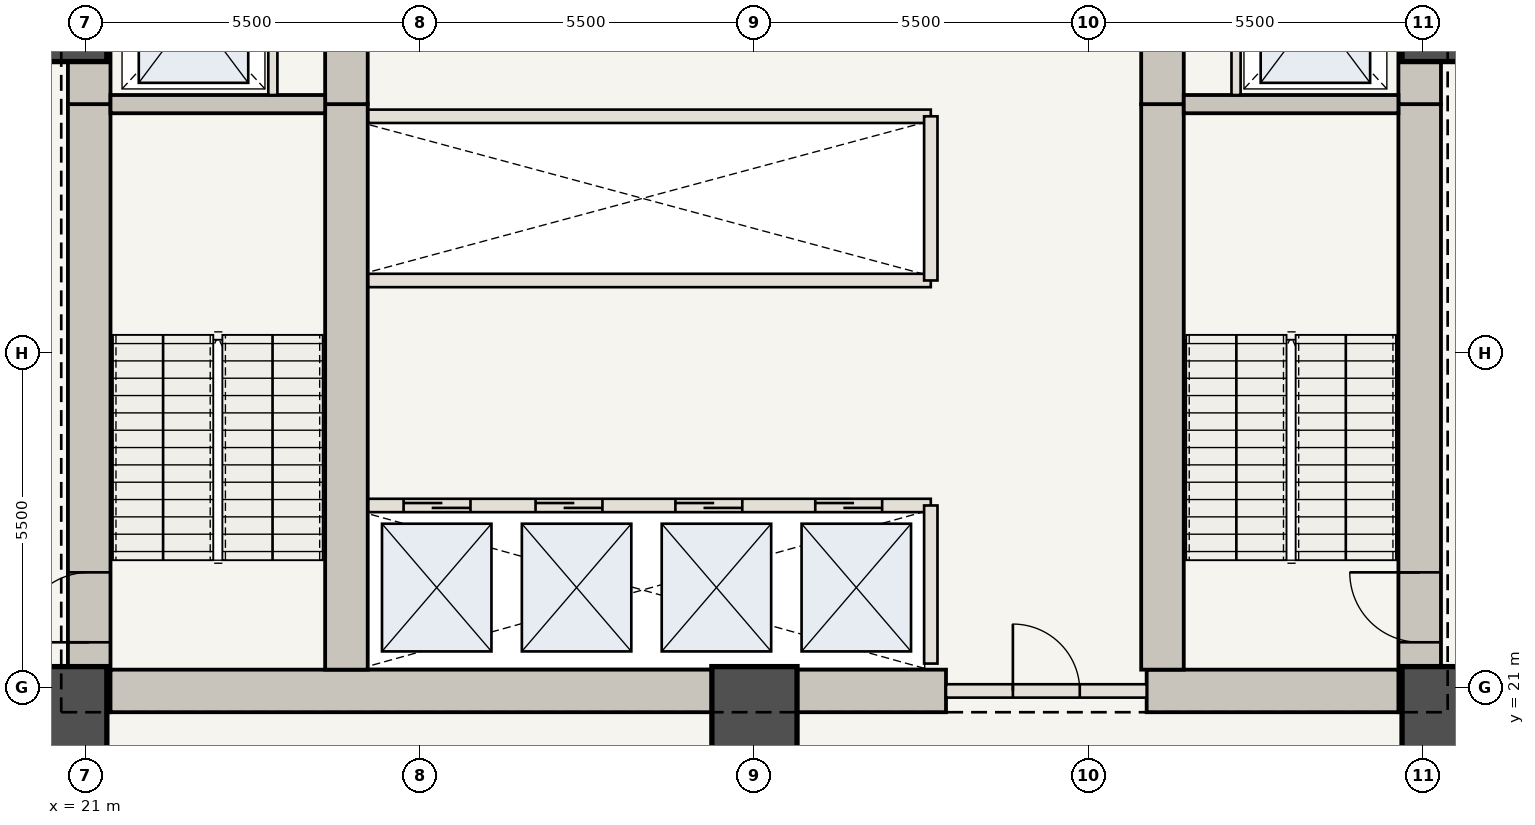
"""IFC4 building model, lengths in metres.
Left out: names, types, materials, properties, quantities, classifications, styles, units other than length and angle.
Written with IfcOpenShell. Run it as: python <this file> out.ifc"""

import sys

from ifc_helpers import new_model, si_unit, direction, frame, frame_2d, origin, origin_2d, place, context, subcontext, project, spatial, rectangle, extrude, element, fill, save


model = new_model("IFC4")
c1 = context("Model", 3, precision=1e-05, world=origin(), true_north=direction((0.0, 1.0)))
c2 = subcontext(c1, "Body", "Model", "MODEL_VIEW")
j1 = project(units=[si_unit("LENGTHUNIT", "METRE"), si_unit("PLANEANGLEUNIT", "RADIAN")], contexts=[c1])
p1 = place(None, origin())
s1 = spatial("IfcSite", under=j1, at=p1, CompositionType="ELEMENT")
p2 = place(p1, origin())
s2 = spatial("IfcBuilding", under=s1, at=p2, CompositionType="ELEMENT")
p3 = place(p2, frame((0.0, 0.0, 29.4)))
s3 = spatial("IfcBuildingStorey", under=s2, at=p3, CompositionType="ELEMENT", Elevation=29.4)
p4 = place(p3, frame((21.06, 20.6, 0.0), z_axis=(0.0, 0.0, 1.0), x_axis=(0.0, 1.0, 0.0)))
e1 = element("IfcWall", 1, at=p4, inside=s3, PredefinedType="SHEAR", context=c2, shape_type="SweptSolid", body=[
    extrude(rectangle(XDim=10.0, YDim=0.7, at=frame_2d((5.0, 0.0))), origin(), (0.0, 0.0, 1.0), 4.9),
])
p5 = place(p4, frame((1.15, 0.0, 0.0)))
e2 = element("IfcOpeningElement", 2, at=p5, cuts=e1, PredefinedType="OPENING", context=c2, shape_type="SweptSolid", body=[
    extrude(rectangle(XDim=1.15, YDim=2.15, at=frame_2d((0.575, 1.075))), frame((0.0, 0.36, 0.0), z_axis=(0.0, -1.0, 0.0), x_axis=(1.0, 0.0, 0.0)), (0.0, 0.0, 1.0), 0.72),
])
p6 = place(p3, frame((21.06, 30.6, 0.0), z_axis=(0.0, 0.0, 1.0), x_axis=(0.0, 1.0, 0.0)))
e3 = element("IfcWall", 3, at=p6, inside=s3, PredefinedType="SHEAR", context=c2, shape_type="SweptSolid", body=[
    extrude(rectangle(XDim=12.75, YDim=0.7, at=frame_2d((6.375, 0.0))), origin(), (0.0, 0.0, 1.0), 4.9),
])
p7 = place(p6, frame((4.2, 0.0, 0.0)))
e4 = element("IfcOpeningElement", 4, at=p7, cuts=e3, PredefinedType="OPENING", context=c2, shape_type="SweptSolid", body=[
    extrude(rectangle(XDim=1.1, YDim=2.15, at=frame_2d((0.55, 1.075))), frame((0.0, 0.36, 0.0), z_axis=(0.0, -1.0, 0.0), x_axis=(1.0, 0.0, 0.0)), (0.0, 0.0, 1.0), 0.72),
])
p8 = place(p6, frame((9.2, 0.0, 0.0)))
e5 = element("IfcOpeningElement", 5, at=p8, cuts=e3, PredefinedType="OPENING", context=c2, shape_type="SweptSolid", body=[
    extrude(rectangle(XDim=0.92, YDim=2.1, at=frame_2d((0.46, 1.05))), frame((0.0, 0.36, 0.0), z_axis=(0.0, -1.0, 0.0), x_axis=(1.0, 0.0, 0.0)), (0.0, 0.0, 1.0), 0.72),
])
p9 = place(p3, frame((42.94, 20.6, 0.0), z_axis=(0.0, 0.0, 1.0), x_axis=(0.0, 1.0, 0.0)))
e6 = element("IfcWall", 6, at=p9, inside=s3, PredefinedType="SHEAR", context=c2, shape_type="SweptSolid", body=[
    extrude(rectangle(XDim=10.0, YDim=0.7, at=frame_2d((5.0, 0.0))), origin(), (0.0, 0.0, 1.0), 4.9),
])
p10 = place(p9, frame((1.15, 0.0, 0.0)))
e7 = element("IfcOpeningElement", 7, at=p10, cuts=e6, PredefinedType="OPENING", context=c2, shape_type="SweptSolid", body=[
    extrude(rectangle(XDim=1.15, YDim=2.15, at=frame_2d((0.575, 1.075))), frame((0.0, 0.36, 0.0), z_axis=(0.0, -1.0, 0.0), x_axis=(1.0, 0.0, 0.0)), (0.0, 0.0, 1.0), 0.72),
])
p11 = place(p3, frame((42.94, 30.6, 0.0), z_axis=(0.0, 0.0, 1.0), x_axis=(0.0, 1.0, 0.0)))
e8 = element("IfcWall", 8, at=p11, inside=s3, PredefinedType="SHEAR", context=c2, shape_type="SweptSolid", body=[
    extrude(rectangle(XDim=12.75, YDim=0.7, at=frame_2d((6.375, 0.0))), origin(), (0.0, 0.0, 1.0), 4.9),
])
p12 = place(p11, frame((4.2, 0.0, 0.0)))
e9 = element("IfcOpeningElement", 9, at=p12, cuts=e8, PredefinedType="OPENING", context=c2, shape_type="SweptSolid", body=[
    extrude(rectangle(XDim=1.1, YDim=2.15, at=frame_2d((0.55, 1.075))), frame((0.0, 0.36, 0.0), z_axis=(0.0, -1.0, 0.0), x_axis=(1.0, 0.0, 0.0)), (0.0, 0.0, 1.0), 0.72),
])
p13 = place(p11, frame((8.05, 0.0, 0.0)))
e10 = element("IfcOpeningElement", 10, at=p13, cuts=e8, PredefinedType="OPENING", context=c2, shape_type="SweptSolid", body=[
    extrude(rectangle(XDim=0.88, YDim=2.1, at=frame_2d((0.44, 1.05))), frame((0.0, 0.36, 0.0), z_axis=(0.0, -1.0, 0.0), x_axis=(1.0, 0.0, 0.0)), (0.0, 0.0, 1.0), 0.72),
])
p14 = place(p11, frame((9.45, 0.0, 0.0)))
e11 = element("IfcOpeningElement", 11, at=p14, cuts=e8, PredefinedType="OPENING", context=c2, shape_type="SweptSolid", body=[
    extrude(rectangle(XDim=0.88, YDim=2.1, at=frame_2d((0.44, 1.05))), frame((0.0, 0.36, 0.0), z_axis=(0.0, -1.0, 0.0), x_axis=(1.0, 0.0, 0.0)), (0.0, 0.0, 1.0), 0.72),
])
p15 = place(p11, frame((10.85, 0.0, 0.0)))
e12 = element("IfcOpeningElement", 12, at=p15, cuts=e8, PredefinedType="OPENING", context=c2, shape_type="SweptSolid", body=[
    extrude(rectangle(XDim=0.88, YDim=2.1, at=frame_2d((0.44, 1.05))), frame((0.0, 0.36, 0.0), z_axis=(0.0, -1.0, 0.0), x_axis=(1.0, 0.0, 0.0)), (0.0, 0.0, 1.0), 0.72),
])
p16 = place(p3, frame((21.41, 20.95, 0.0), z_axis=(0.0, 0.0, 1.0), x_axis=(1.0, 0.0, 0.0)))
e13 = element("IfcWall", 13, at=p16, inside=s3, PredefinedType="SHEAR", context=c2, shape_type="SweptSolid", body=[
    extrude(rectangle(XDim=13.74, YDim=0.7, at=frame_2d((6.87, 0.0))), origin(), (0.0, 0.0, 1.0), 4.9),
])
p17 = place(p3, frame((38.45, 20.95, 0.0), z_axis=(0.0, 0.0, 1.0), x_axis=(1.0, 0.0, 0.0)))
e14 = element("IfcWall", 14, at=p17, inside=s3, PredefinedType="SHEAR", context=c2, shape_type="SweptSolid", body=[
    extrude(rectangle(XDim=4.14, YDim=0.7, at=frame_2d((2.07, 0.0))), origin(), (0.0, 0.0, 1.0), 4.9),
])
p18 = place(p3, frame((25.29, 21.3, 0.0), z_axis=(0.0, 0.0, 1.0), x_axis=(0.0, 1.0, 0.0)))
e15 = element("IfcWall", 15, at=p18, inside=s3, PredefinedType="SHEAR", context=c2, shape_type="SweptSolid", body=[
    extrude(rectangle(XDim=9.3, YDim=0.7, at=frame_2d((4.65, 0.0))), origin(), (0.0, 0.0, 1.0), 4.9),
])
p19 = place(p3, frame((25.29, 30.6, 0.0), z_axis=(0.0, 0.0, 1.0), x_axis=(0.0, 1.0, 0.0)))
e16 = element("IfcWall", 16, at=p19, inside=s3, PredefinedType="SHEAR", context=c2, shape_type="SweptSolid", body=[
    extrude(rectangle(XDim=12.05, YDim=0.7, at=frame_2d((6.025, 0.0))), origin(), (0.0, 0.0, 1.0), 4.9),
])
p20 = place(p19, frame((6.25, 0.0, 0.0)))
e17 = element("IfcOpeningElement", 17, at=p20, cuts=e16, PredefinedType="OPENING", context=c2, shape_type="SweptSolid", body=[
    extrude(rectangle(XDim=1.1, YDim=2.15, at=frame_2d((0.55, 1.075))), frame((0.0, 0.36, 0.0), z_axis=(0.0, -1.0, 0.0), x_axis=(1.0, 0.0, 0.0)), (0.0, 0.0, 1.0), 0.72),
])
p21 = place(p3, frame((38.71, 21.3, 0.0), z_axis=(0.0, 0.0, 1.0), x_axis=(0.0, 1.0, 0.0)))
e18 = element("IfcWall", 18, at=p21, inside=s3, PredefinedType="SHEAR", context=c2, shape_type="SweptSolid", body=[
    extrude(rectangle(XDim=9.3, YDim=0.7, at=frame_2d((4.65, 0.0))), origin(), (0.0, 0.0, 1.0), 4.9),
])
p22 = place(p3, frame((38.71, 30.6, 0.0), z_axis=(0.0, 0.0, 1.0), x_axis=(0.0, 1.0, 0.0)))
e19 = element("IfcWall", 19, at=p22, inside=s3, PredefinedType="SHEAR", context=c2, shape_type="SweptSolid", body=[
    extrude(rectangle(XDim=12.05, YDim=0.7, at=frame_2d((6.025, 0.0))), origin(), (0.0, 0.0, 1.0), 4.9),
])
for number, where, z_axis, x_axis in (
    (20, (20.65, 20.65, 0.0), (0.0, 0.0, 1.0), (1.0, 0.0, 0.0)),
    (21, (32.0, 20.65, 0.0), (0.0, 0.0, 1.0), (1.0, 0.0, 0.0)),
    (22, (43.35, 20.65, 0.0), (0.0, 0.0, 1.0), (1.0, 0.0, 0.0)),
    (23, (43.35, 32.0, 0.0), (0.0, 0.0, 1.0), (1.0, 0.0, 0.0)),
    (24, (20.65, 32.0, 0.0), (0.0, 0.0, 1.0), (1.0, 0.0, 0.0)),
):
    element("IfcColumn", number, at=place(p3, frame(where, z_axis=z_axis, x_axis=x_axis)), inside=s3, PredefinedType="COLUMN", context=c2, shape_type="SweptSolid", body=[
        extrude(rectangle(XDim=1.4, YDim=1.4, at=origin_2d()), origin(), (0.0, 0.0, 1.0), 4.48),
    ])
for number, where, z_axis, x_axis in (
    (25, (21.41, 30.6, 0.0), (0.0, 0.0, 1.0), (1.0, 0.0, 0.0)),
    (26, (39.06, 30.6, 0.0), (0.0, 0.0, 1.0), (1.0, 0.0, 0.0)),
):
    element("IfcWall", number, at=place(p3, frame(where, z_axis=z_axis, x_axis=x_axis)), inside=s3, PredefinedType="SHEAR", context=c2, shape_type="SweptSolid", body=[
        extrude(rectangle(XDim=3.53, YDim=0.3, at=frame_2d((1.765, 0.0))), origin(), (0.0, 0.0, 1.0), 4.48),
    ])
for number, where, z_axis, x_axis in (
    (27, (24.08, 30.75, 0.0), (0.0, 0.0, 1.0), (0.0, 1.0, 0.0)),
    (28, (39.92, 30.75, 0.0), (0.0, 0.0, 1.0), (0.0, 1.0, 0.0)),
):
    element("IfcWall", number, at=place(p3, frame(where, z_axis=z_axis, x_axis=x_axis)), inside=s3, PredefinedType="STANDARD", context=c2, shape_type="SweptSolid", body=[
        extrude(rectangle(XDim=2.65, YDim=0.15, at=frame_2d((1.325, 0.0))), origin(), (0.0, 0.0, 1.0), 4.48),
    ])
p23 = place(p3, frame((35.15, 20.95, 0.0), z_axis=(0.0, 0.0, 1.0), x_axis=(1.0, 0.0, 0.0)))
e29 = element("IfcWall", 29, at=p23, inside=s3, PredefinedType="STANDARD", context=c2, shape_type="SweptSolid", body=[
    extrude(rectangle(XDim=3.3, YDim=0.22, at=frame_2d((1.65, 0.0))), origin(), (0.0, 0.0, 1.0), 4.48),
])
p24 = place(p23, frame((1.1, 0.0, 0.0)))
e30 = element("IfcOpeningElement", 30, at=p24, cuts=e29, PredefinedType="OPENING", context=c2, shape_type="SweptSolid", body=[
    extrude(rectangle(XDim=1.1, YDim=2.15, at=frame_2d((0.55, 1.075))), frame((0.0, 0.12, 0.0), z_axis=(0.0, -1.0, 0.0), x_axis=(1.0, 0.0, 0.0)), (0.0, 0.0, 1.0), 0.24),
])
p25 = place(p3, frame((25.65, 24.0, 0.0), z_axis=(0.0, 0.0, 1.0), x_axis=(1.0, 0.0, 0.0)))
e31 = element("IfcWall", 31, at=p25, inside=s3, PredefinedType="STANDARD", context=c2, shape_type="SweptSolid", body=[
    extrude(rectangle(XDim=9.25, YDim=0.22, at=frame_2d((4.625, 0.0))), origin(), (0.0, 0.0, 1.0), 4.48),
])
p26 = place(p25, frame((0.58, 0.0, 0.0)))
e32 = element("IfcOpeningElement", 32, at=p26, cuts=e31, PredefinedType="OPENING", context=c2, shape_type="SweptSolid", body=[
    extrude(rectangle(XDim=1.1, YDim=2.15, at=frame_2d((0.55, 1.075))), frame((0.0, 0.12, 0.0), z_axis=(0.0, -1.0, 0.0), x_axis=(1.0, 0.0, 0.0)), (0.0, 0.0, 1.0), 0.24),
])
p27 = place(p25, frame((2.75, 0.0, 0.0)))
e33 = element("IfcOpeningElement", 33, at=p27, cuts=e31, PredefinedType="OPENING", context=c2, shape_type="SweptSolid", body=[
    extrude(rectangle(XDim=1.1, YDim=2.15, at=frame_2d((0.55, 1.075))), frame((0.0, 0.12, 0.0), z_axis=(0.0, -1.0, 0.0), x_axis=(1.0, 0.0, 0.0)), (0.0, 0.0, 1.0), 0.24),
])
p28 = place(p25, frame((5.05, 0.0, 0.0)))
e34 = element("IfcOpeningElement", 34, at=p28, cuts=e31, PredefinedType="OPENING", context=c2, shape_type="SweptSolid", body=[
    extrude(rectangle(XDim=1.1, YDim=2.15, at=frame_2d((0.55, 1.075))), frame((0.0, 0.12, 0.0), z_axis=(0.0, -1.0, 0.0), x_axis=(1.0, 0.0, 0.0)), (0.0, 0.0, 1.0), 0.24),
])
p29 = place(p25, frame((7.35, 0.0, 0.0)))
e35 = element("IfcOpeningElement", 35, at=p29, cuts=e31, PredefinedType="OPENING", context=c2, shape_type="SweptSolid", body=[
    extrude(rectangle(XDim=1.1, YDim=2.15, at=frame_2d((0.55, 1.075))), frame((0.0, 0.12, 0.0), z_axis=(0.0, -1.0, 0.0), x_axis=(1.0, 0.0, 0.0)), (0.0, 0.0, 1.0), 0.24),
])
p30 = place(p3, frame((34.9, 21.4, 0.0), z_axis=(0.0, 0.0, 1.0), x_axis=(0.0, 1.0, 0.0)))
e36 = element("IfcWall", 36, at=p30, inside=s3, PredefinedType="STANDARD", context=c2, shape_type="SweptSolid", body=[
    extrude(rectangle(XDim=2.6, YDim=0.22, at=frame_2d((1.3, 0.0))), origin(), (0.0, 0.0, 1.0), 4.48),
])
for number, where, z_axis, x_axis in (
    (37, (25.65, 27.7, 0.0), (0.0, 0.0, 1.0), (1.0, 0.0, 0.0)),
    (38, (25.65, 30.4, 0.0), (0.0, 0.0, 1.0), (1.0, 0.0, 0.0)),
):
    element("IfcWall", number, at=place(p3, frame(where, z_axis=z_axis, x_axis=x_axis)), inside=s3, PredefinedType="STANDARD", context=c2, shape_type="SweptSolid", body=[
        extrude(rectangle(XDim=9.25, YDim=0.22, at=frame_2d((4.625, 0.0))), origin(), (0.0, 0.0, 1.0), 4.48),
    ])
p31 = place(p3, frame((34.9, 27.7, 0.0), z_axis=(0.0, 0.0, 1.0), x_axis=(0.0, 1.0, 0.0)))
e39 = element("IfcWall", 39, at=p31, inside=s3, PredefinedType="STANDARD", context=c2, shape_type="SweptSolid", body=[
    extrude(rectangle(XDim=2.7, YDim=0.22, at=frame_2d((1.35, 0.0))), origin(), (0.0, 0.0, 1.0), 4.48),
])
p32 = place(p5, origin())
e40 = element("IfcDoor", 40, at=p32, inside=s3, OperationType="SINGLE_SWING_LEFT", PredefinedType="DOOR", context=c2, shape_type="SweptSolid", body=[
    extrude(rectangle(XDim=1.15, YDim=2.15, at=frame_2d((0.575, 1.075))), frame((0.0, 0.025, 0.0), z_axis=(0.0, -1.0, 0.0), x_axis=(1.0, 0.0, 0.0)), (0.0, 0.0, 1.0), 0.05),
])
fill(e2, e40)
p33 = place(p10, origin())
e41 = element("IfcDoor", 41, at=p33, inside=s3, OperationType="SINGLE_SWING_RIGHT", PredefinedType="DOOR", context=c2, shape_type="SweptSolid", body=[
    extrude(rectangle(XDim=1.15, YDim=2.15, at=frame_2d((0.575, 1.075))), frame((0.0, 0.025, 0.0), z_axis=(0.0, -1.0, 0.0), x_axis=(1.0, 0.0, 0.0)), (0.0, 0.0, 1.0), 0.05),
])
fill(e7, e41)
p34 = place(p24, origin())
e42 = element("IfcDoor", 42, at=p34, inside=s3, OperationType="SINGLE_SWING_LEFT", PredefinedType="DOOR", context=c2, shape_type="SweptSolid", body=[
    extrude(rectangle(XDim=1.1, YDim=2.15, at=frame_2d((0.55, 1.075))), frame((0.0, 0.025, 0.0), z_axis=(0.0, -1.0, 0.0), x_axis=(1.0, 0.0, 0.0)), (0.0, 0.0, 1.0), 0.05),
])
fill(e30, e42)
p35 = place(p26, origin())
e43 = element("IfcDoor", 43, at=p35, inside=s3, OperationType="DOUBLE_DOOR_SLIDING", PredefinedType="DOOR", context=c2, shape_type="SweptSolid", body=[
    extrude(rectangle(XDim=1.1, YDim=2.15, at=frame_2d((0.55, 1.075))), frame((0.0, 0.025, 0.0), z_axis=(0.0, -1.0, 0.0), x_axis=(1.0, 0.0, 0.0)), (0.0, 0.0, 1.0), 0.05),
])
fill(e32, e43)
p36 = place(p27, origin())
e44 = element("IfcDoor", 44, at=p36, inside=s3, OperationType="DOUBLE_DOOR_SLIDING", PredefinedType="DOOR", context=c2, shape_type="SweptSolid", body=[
    extrude(rectangle(XDim=1.1, YDim=2.15, at=frame_2d((0.55, 1.075))), frame((0.0, 0.025, 0.0), z_axis=(0.0, -1.0, 0.0), x_axis=(1.0, 0.0, 0.0)), (0.0, 0.0, 1.0), 0.05),
])
fill(e33, e44)
p37 = place(p28, origin())
e45 = element("IfcDoor", 45, at=p37, inside=s3, OperationType="DOUBLE_DOOR_SLIDING", PredefinedType="DOOR", context=c2, shape_type="SweptSolid", body=[
    extrude(rectangle(XDim=1.1, YDim=2.15, at=frame_2d((0.55, 1.075))), frame((0.0, 0.025, 0.0), z_axis=(0.0, -1.0, 0.0), x_axis=(1.0, 0.0, 0.0)), (0.0, 0.0, 1.0), 0.05),
])
fill(e34, e45)
p38 = place(p29, origin())
e46 = element("IfcDoor", 46, at=p38, inside=s3, OperationType="DOUBLE_DOOR_SLIDING", PredefinedType="DOOR", context=c2, shape_type="SweptSolid", body=[
    extrude(rectangle(XDim=1.1, YDim=2.15, at=frame_2d((0.55, 1.075))), frame((0.0, 0.025, 0.0), z_axis=(0.0, -1.0, 0.0), x_axis=(1.0, 0.0, 0.0)), (0.0, 0.0, 1.0), 0.05),
])
fill(e35, e46)
save(model, sys.argv[1])
